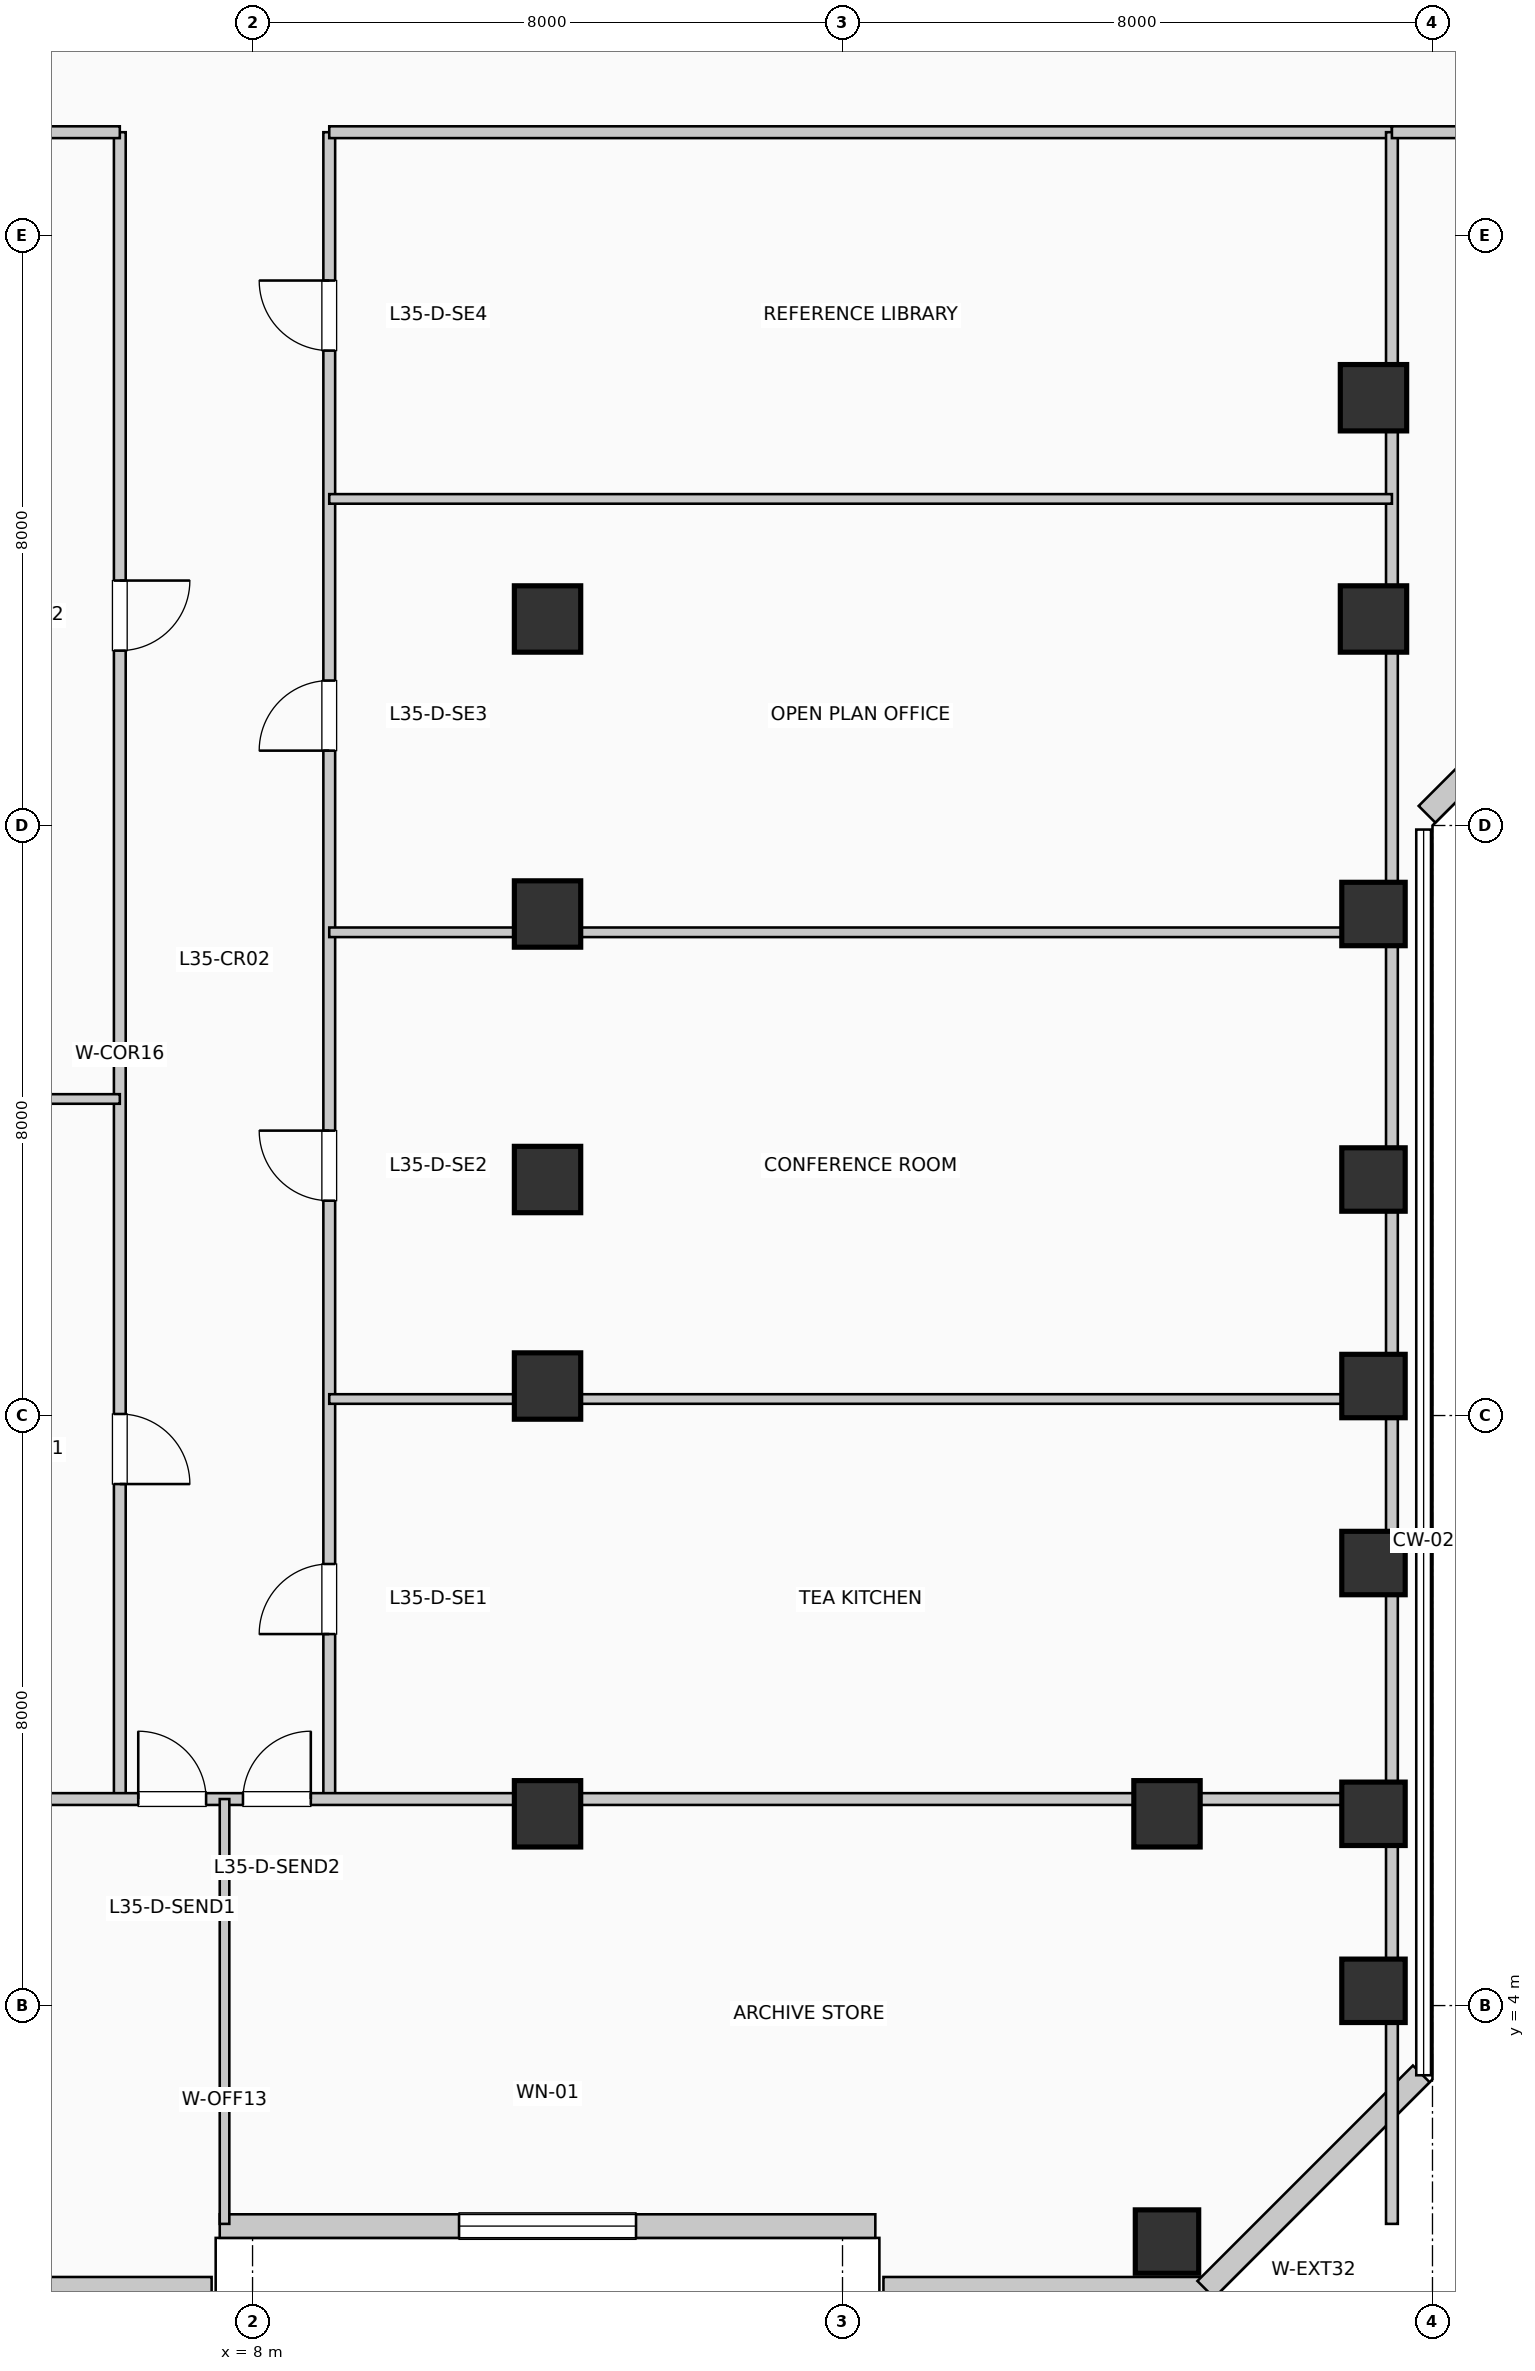
"""IFC4 building model, lengths in metres.
Left out: names, types, materials, properties, quantities, classifications, styles, units other than length and angle.
Written with IfcOpenShell. Run it as: python <this file> out.ifc"""

import sys

from ifc_helpers import new_model, si_unit, direction, frame, frame_2d, origin, origin_2d, place, context, subcontext, project, spatial, rectangle, extrude, element, fill, save


model = new_model("IFC4")
c1 = context("Model", 3, precision=1e-05, world=origin(), true_north=direction((0.0, 1.0)))
c2 = subcontext(c1, "Body", "Model", "MODEL_VIEW")
j1 = project(units=[si_unit("LENGTHUNIT", "METRE"), si_unit("PLANEANGLEUNIT", "RADIAN")], contexts=[c1])
p1 = place(None, origin())
s1 = spatial("IfcSite", under=j1, at=p1, CompositionType="ELEMENT")
p2 = place(p1, origin())
s2 = spatial("IfcBuilding", under=s1, at=p2, CompositionType="ELEMENT")
p3 = place(p2, frame((0.0, 0.0, 146.85)))
s3 = spatial("IfcBuildingStorey", under=s2, at=p3, CompositionType="ELEMENT", Elevation=146.85)
for number, where, z_axis, x_axis in (
    (1, (12.0, 6.6, 0.0), (0.0, 0.0, 1.0), (1.0, 0.0, 0.0)),
    (2, (12.0, 12.4, 0.0), (0.0, 0.0, 1.0), (1.0, 0.0, 0.0)),
    (3, (12.0, 15.2, 0.0), (0.0, 0.0, 1.0), (1.0, 0.0, 0.0)),
    (4, (12.0, 18.8, 0.0), (0.0, 0.0, 1.0), (1.0, 0.0, 0.0)),
    (5, (12.0, 22.8, 0.0), (0.0, 0.0, 1.0), (1.0, 0.0, 0.0)),
):
    element("IfcColumn", number, at=place(p3, frame(where, z_axis=z_axis, x_axis=x_axis)), inside=s3, PredefinedType="COLUMN", context=c2, shape_type="SweptSolid", body=[
        extrude(rectangle(XDim=0.9, YDim=0.9, at=origin_2d()), origin(), (0.0, 0.0, 1.0), 3.96),
    ])
p4 = place(p3, frame((20.4, 0.8, 0.0), z_axis=(0.0, 0.0, 1.0), x_axis=(1.0, 0.0, 0.0)))
e6 = element("IfcColumn", 6, at=p4, inside=s3, PredefinedType="COLUMN", context=c2, shape_type="SweptSolid", body=[
    extrude(rectangle(XDim=0.86, YDim=0.86, at=origin_2d()), origin(), (0.0, 0.0, 1.0), 3.96),
])
p5 = place(p3, frame((20.4, 6.6, 0.0), z_axis=(0.0, 0.0, 1.0), x_axis=(1.0, 0.0, 0.0)))
e7 = element("IfcColumn", 7, at=p5, inside=s3, PredefinedType="COLUMN", context=c2, shape_type="SweptSolid", body=[
    extrude(rectangle(XDim=0.9, YDim=0.9, at=origin_2d()), origin(), (0.0, 0.0, 1.0), 3.96),
])
for number, where, z_axis, x_axis in (
    (8, (23.2, 4.2, 0.0), (0.0, 0.0, 1.0), (1.0, 0.0, 0.0)),
    (9, (23.2, 6.6, 0.0), (0.0, 0.0, 1.0), (1.0, 0.0, 0.0)),
    (10, (23.2, 10.0, 0.0), (0.0, 0.0, 1.0), (1.0, 0.0, 0.0)),
    (11, (23.2, 12.4, 0.0), (0.0, 0.0, 1.0), (1.0, 0.0, 0.0)),
    (12, (23.2, 15.2, 0.0), (0.0, 0.0, 1.0), (1.0, 0.0, 0.0)),
    (13, (23.2, 18.8, 0.0), (0.0, 0.0, 1.0), (1.0, 0.0, 0.0)),
):
    element("IfcColumn", number, at=place(p3, frame(where, z_axis=z_axis, x_axis=x_axis)), inside=s3, PredefinedType="COLUMN", context=c2, shape_type="SweptSolid", body=[
        extrude(rectangle(XDim=0.86, YDim=0.86, at=origin_2d()), origin(), (0.0, 0.0, 1.0), 3.96),
    ])
for number, where, z_axis, x_axis in (
    (14, (23.2, 22.8, 0.0), (0.0, 0.0, 1.0), (1.0, 0.0, 0.0)),
    (15, (23.2, 25.8, 0.0), (0.0, 0.0, 1.0), (1.0, 0.0, 0.0)),
):
    element("IfcColumn", number, at=place(p3, frame(where, z_axis=z_axis, x_axis=x_axis)), inside=s3, PredefinedType="COLUMN", context=c2, shape_type="SweptSolid", body=[
        extrude(rectangle(XDim=0.9, YDim=0.9, at=origin_2d()), origin(), (0.0, 0.0, 1.0), 3.96),
    ])
p6 = place(p3, frame((3.055, 0.16, 0.0), z_axis=(0.0, 0.0, 1.0), x_axis=(1.0, 0.0, 0.0)))
e16 = element("IfcWall", 16, at=p6, inside=s3, PredefinedType="SOLIDWALL", context=c2, shape_type="SweptSolid", body=[
    extrude(rectangle(XDim=4.39, YDim=0.32, at=frame_2d((2.195, 0.0))), origin(), (0.0, 0.0, 1.0), 3.71),
])
p7 = place(p3, frame((7.555, 1.01, 0.0), z_axis=(0.0, 0.0, 1.0), x_axis=(1.0, 0.0, 0.0)))
e17 = element("IfcWall", 17, at=p7, inside=s3, PredefinedType="SOLIDWALL", context=c2, shape_type="SweptSolid", body=[
    extrude(rectangle(XDim=8.89, YDim=0.32, at=frame_2d((4.445, 0.0))), origin(), (0.0, 0.0, 1.0), 3.71),
])
p8 = place(p7, frame((3.245, 0.0, 0.85)))
e18 = element("IfcOpeningElement", 18, at=p8, cuts=e17, PredefinedType="OPENING", context=c2, shape_type="SweptSolid", body=[
    extrude(rectangle(XDim=2.4, YDim=2.05, at=frame_2d((1.2, 1.025))), frame((0.0, 0.17, 0.0), z_axis=(0.0, -1.0, 0.0), x_axis=(1.0, 0.0, 0.0)), (0.0, 0.0, 1.0), 0.34),
])
p9 = place(p3, frame((16.555, 0.16, 0.0), z_axis=(0.0, 0.0, 1.0), x_axis=(1.0, 0.0, 0.0)))
e19 = element("IfcWall", 19, at=p9, inside=s3, PredefinedType="SOLIDWALL", context=c2, shape_type="SweptSolid", body=[
    extrude(rectangle(XDim=4.39, YDim=0.32, at=frame_2d((2.195, 0.0))), origin(), (0.0, 0.0, 1.0), 3.71),
])
p10 = place(p3, frame((20.926, 0.152, 0.0), z_axis=(0.0, 0.0, 1.0), x_axis=(0.707106781187, 0.707106781187, 0.0)))
e20 = element("IfcWall", 20, at=p10, inside=s3, PredefinedType="SOLIDWALL", context=c2, shape_type="SweptSolid", body=[
    extrude(rectangle(XDim=4.133, YDim=0.32, at=frame_2d((2.066, 0.0))), origin(), (0.0, 0.0, 1.0), 3.71),
])
p11 = place(p3, frame((23.926, 20.152, 0.0), z_axis=(0.0, 0.0, 1.0), x_axis=(0.707106781187, 0.707106781187, 0.0)))
e21 = element("IfcWall", 21, at=p11, inside=s3, PredefinedType="SOLIDWALL", context=c2, shape_type="SweptSolid", body=[
    extrude(rectangle(XDim=2.718, YDim=0.32, at=frame_2d((1.359, 0.0))), origin(), (0.0, 0.0, 1.0), 3.71),
])
p12 = place(p3, frame((6.2, 6.8, 0.0), z_axis=(0.0, 0.0, 1.0), x_axis=(0.0, 1.0, 0.0)))
e22 = element("IfcWall", 22, at=p12, inside=s3, PredefinedType="PARTITIONING", context=c2, shape_type="SweptSolid", body=[
    extrude(rectangle(XDim=22.6, YDim=0.16, at=frame_2d((11.3, 0.0))), origin(), (0.0, 0.0, 1.0), 3.71),
])
p13 = place(p12, frame((5.221, 0.0, 0.0), z_axis=(0.0, 0.0, 1.0), x_axis=(-1.0, 0.0, 0.0)))
e23 = element("IfcOpeningElement", 23, at=p13, cuts=e22, PredefinedType="OPENING", context=c2, shape_type="SweptSolid", body=[
    extrude(rectangle(XDim=0.95, YDim=2.15, at=frame_2d((0.475, 1.075))), frame((0.0, 0.09, 0.0), z_axis=(0.0, -1.0, 0.0), x_axis=(1.0, 0.0, 0.0)), (0.0, 0.0, 1.0), 0.18),
])
p14 = place(p12, frame((16.521, 0.0, 0.0), z_axis=(0.0, 0.0, 1.0), x_axis=(-1.0, 0.0, 0.0)))
e24 = element("IfcOpeningElement", 24, at=p14, cuts=e22, PredefinedType="OPENING", context=c2, shape_type="SweptSolid", body=[
    extrude(rectangle(XDim=0.95, YDim=2.15, at=frame_2d((0.475, 1.075))), frame((0.0, 0.09, 0.0), z_axis=(0.0, -1.0, 0.0), x_axis=(1.0, 0.0, 0.0)), (0.0, 0.0, 1.0), 0.18),
])
p15 = place(p3, frame((9.04, 6.8, 0.0), z_axis=(0.0, 0.0, 1.0), x_axis=(0.0, 1.0, 0.0)))
e25 = element("IfcWall", 25, at=p15, inside=s3, PredefinedType="PARTITIONING", context=c2, shape_type="SweptSolid", body=[
    extrude(rectangle(XDim=22.6, YDim=0.16, at=frame_2d((11.3, 0.0))), origin(), (0.0, 0.0, 1.0), 3.71),
])
p16 = place(p15, frame((2.237, 0.0, 0.0)))
e26 = element("IfcOpeningElement", 26, at=p16, cuts=e25, PredefinedType="OPENING", context=c2, shape_type="SweptSolid", body=[
    extrude(rectangle(XDim=0.95, YDim=2.15, at=frame_2d((0.475, 1.075))), frame((0.0, 0.09, 0.0), z_axis=(0.0, -1.0, 0.0), x_axis=(1.0, 0.0, 0.0)), (0.0, 0.0, 1.0), 0.18),
])
p17 = place(p15, frame((8.113, 0.0, 0.0)))
e27 = element("IfcOpeningElement", 27, at=p17, cuts=e25, PredefinedType="OPENING", context=c2, shape_type="SweptSolid", body=[
    extrude(rectangle(XDim=0.95, YDim=2.15, at=frame_2d((0.475, 1.075))), frame((0.0, 0.09, 0.0), z_axis=(0.0, -1.0, 0.0), x_axis=(1.0, 0.0, 0.0)), (0.0, 0.0, 1.0), 0.18),
])
p18 = place(p15, frame((14.215, 0.0, 0.0)))
e28 = element("IfcOpeningElement", 28, at=p18, cuts=e25, PredefinedType="OPENING", context=c2, shape_type="SweptSolid", body=[
    extrude(rectangle(XDim=0.95, YDim=2.15, at=frame_2d((0.475, 1.075))), frame((0.0, 0.09, 0.0), z_axis=(0.0, -1.0, 0.0), x_axis=(1.0, 0.0, 0.0)), (0.0, 0.0, 1.0), 0.18),
])
p19 = place(p15, frame((19.639, 0.0, 0.0)))
e29 = element("IfcOpeningElement", 29, at=p19, cuts=e25, PredefinedType="OPENING", context=c2, shape_type="SweptSolid", body=[
    extrude(rectangle(XDim=0.95, YDim=2.15, at=frame_2d((0.475, 1.075))), frame((0.0, 0.09, 0.0), z_axis=(0.0, -1.0, 0.0), x_axis=(1.0, 0.0, 0.0)), (0.0, 0.0, 1.0), 0.18),
])
p20 = place(p3, frame((0.19, 6.8, 0.0), z_axis=(0.0, 0.0, 1.0), x_axis=(1.0, 0.0, 0.0)))
e30 = element("IfcWall", 30, at=p20, inside=s3, PredefinedType="PARTITIONING", context=c2, shape_type="SweptSolid", body=[
    extrude(rectangle(XDim=23.26, YDim=0.16, at=frame_2d((11.63, 0.0))), origin(), (0.0, 0.0, 1.0), 3.045),
])
p21 = place(p20, frame((6.26, 0.0, 0.0)))
e31 = element("IfcOpeningElement", 31, at=p21, cuts=e30, PredefinedType="OPENING", context=c2, shape_type="SweptSolid", body=[
    extrude(rectangle(XDim=0.92, YDim=2.1, at=frame_2d((0.46, 1.05))), frame((0.0, 0.09, 0.0), z_axis=(0.0, -1.0, 0.0), x_axis=(1.0, 0.0, 0.0)), (0.0, 0.0, 1.0), 0.18),
])
p22 = place(p20, frame((7.68, 0.0, 0.0)))
e32 = element("IfcOpeningElement", 32, at=p22, cuts=e30, PredefinedType="OPENING", context=c2, shape_type="SweptSolid", body=[
    extrude(rectangle(XDim=0.92, YDim=2.1, at=frame_2d((0.46, 1.05))), frame((0.0, 0.09, 0.0), z_axis=(0.0, -1.0, 0.0), x_axis=(1.0, 0.0, 0.0)), (0.0, 0.0, 1.0), 0.18),
])
p23 = place(p3, frame((0.19, 29.4, 0.0), z_axis=(0.0, 0.0, 1.0), x_axis=(1.0, 0.0, 0.0)))
e33 = element("IfcWall", 33, at=p23, inside=s3, PredefinedType="PARTITIONING", context=c2, shape_type="SweptSolid", body=[
    extrude(rectangle(XDim=6.01, YDim=0.16, at=frame_2d((3.005, 0.0))), origin(), (0.0, 0.0, 1.0), 3.365),
])
p24 = place(p3, frame((9.04, 29.4, 0.0), z_axis=(0.0, 0.0, 1.0), x_axis=(1.0, 0.0, 0.0)))
e34 = element("IfcWall", 34, at=p24, inside=s3, PredefinedType="PARTITIONING", context=c2, shape_type="SweptSolid", body=[
    extrude(rectangle(XDim=14.41, YDim=0.16, at=frame_2d((7.205, 0.0))), origin(), (0.0, 0.0, 1.0), 3.365),
])
p25 = place(p3, frame((23.45, 1.04, 0.0), z_axis=(0.0, 0.0, 1.0), x_axis=(0.0, 1.0, 0.0)))
e35 = element("IfcWall", 35, at=p25, inside=s3, PredefinedType="PARTITIONING", context=c2, shape_type="SweptSolid", body=[
    extrude(rectangle(XDim=28.36, YDim=0.16, at=frame_2d((14.18, 0.0))), origin(), (0.0, 0.0, 1.0), 3.045),
])
p26 = place(p3, frame((7.62, 1.04, 0.0), z_axis=(0.0, 0.0, 1.0), x_axis=(0.0, 1.0, 0.0)))
e36 = element("IfcWall", 36, at=p26, inside=s3, PredefinedType="PARTITIONING", context=c2, shape_type="SweptSolid", body=[
    extrude(rectangle(XDim=5.76, YDim=0.13, at=frame_2d((2.88, 0.0))), origin(), (0.0, 0.0, 1.0), 3.71),
])
p27 = place(p3, frame((0.19, 16.292, 0.0), z_axis=(0.0, 0.0, 1.0), x_axis=(1.0, 0.0, 0.0)))
e37 = element("IfcWall", 37, at=p27, inside=s3, PredefinedType="PARTITIONING", context=c2, shape_type="SweptSolid", body=[
    extrude(rectangle(XDim=6.01, YDim=0.13, at=frame_2d((3.005, 0.0))), origin(), (0.0, 0.0, 1.0), 3.71),
])
for number, where, z_axis, x_axis in (
    (38, (9.04, 12.224, 0.0), (0.0, 0.0, 1.0), (1.0, 0.0, 0.0)),
    (39, (9.04, 18.552, 0.0), (0.0, 0.0, 1.0), (1.0, 0.0, 0.0)),
):
    element("IfcWall", number, at=place(p3, frame(where, z_axis=z_axis, x_axis=x_axis)), inside=s3, PredefinedType="PARTITIONING", context=c2, shape_type="SweptSolid", body=[
        extrude(rectangle(XDim=14.41, YDim=0.13, at=frame_2d((7.205, 0.0))), origin(), (0.0, 0.0, 1.0), 3.045),
    ])
p28 = place(p3, frame((9.04, 24.428, 0.0), z_axis=(0.0, 0.0, 1.0), x_axis=(1.0, 0.0, 0.0)))
e40 = element("IfcWall", 40, at=p28, inside=s3, PredefinedType="PARTITIONING", context=c2, shape_type="SweptSolid", body=[
    extrude(rectangle(XDim=14.41, YDim=0.13, at=frame_2d((7.205, 0.0))), origin(), (0.0, 0.0, 1.0), 3.71),
])
p29 = place(p3, frame((23.45, 29.4, 0.0), z_axis=(0.0, 0.0, 1.0), x_axis=(1.0, 0.0, 0.0)))
e41 = element("IfcWall", 41, at=p29, inside=s3, PredefinedType="PARTITIONING", context=c2, shape_type="SweptSolid", body=[
    extrude(rectangle(XDim=26.56, YDim=0.16, at=frame_2d((13.28, 0.0))), origin(), (0.0, 0.0, 1.0), 3.365),
])
p30 = place(p29, frame((4.725, 0.0, 0.0), z_axis=(0.0, 0.0, 1.0), x_axis=(-1.0, 0.0, 0.0)))
e42 = element("IfcOpeningElement", 42, at=p30, cuts=e41, PredefinedType="OPENING", context=c2, shape_type="SweptSolid", body=[
    extrude(rectangle(XDim=0.95, YDim=2.15, at=frame_2d((0.475, 1.075))), frame((0.0, 0.09, 0.0), z_axis=(0.0, -1.0, 0.0), x_axis=(1.0, 0.0, 0.0)), (0.0, 0.0, 1.0), 0.18),
])
p31 = place(p29, frame((13.755, 0.0, 0.0), z_axis=(0.0, 0.0, 1.0), x_axis=(-1.0, 0.0, 0.0)))
e43 = element("IfcOpeningElement", 43, at=p31, cuts=e41, PredefinedType="OPENING", context=c2, shape_type="SweptSolid", body=[
    extrude(rectangle(XDim=0.95, YDim=2.15, at=frame_2d((0.475, 1.075))), frame((0.0, 0.09, 0.0), z_axis=(0.0, -1.0, 0.0), x_axis=(1.0, 0.0, 0.0)), (0.0, 0.0, 1.0), 0.18),
])
p32 = place(p29, frame((22.785, 0.0, 0.0), z_axis=(0.0, 0.0, 1.0), x_axis=(-1.0, 0.0, 0.0)))
e44 = element("IfcOpeningElement", 44, at=p32, cuts=e41, PredefinedType="OPENING", context=c2, shape_type="SweptSolid", body=[
    extrude(rectangle(XDim=0.95, YDim=2.15, at=frame_2d((0.475, 1.075))), frame((0.0, 0.09, 0.0), z_axis=(0.0, -1.0, 0.0), x_axis=(1.0, 0.0, 0.0)), (0.0, 0.0, 1.0), 0.18),
])
p33 = place(p8, origin())
e45 = element("IfcWindow", 45, at=p33, inside=s3, PartitioningType="SINGLE_PANEL", PredefinedType="WINDOW", context=c2, shape_type="SweptSolid", body=[
    extrude(rectangle(XDim=2.4, YDim=2.05, at=frame_2d((1.2, 1.025))), frame((0.0, 0.03, 0.0), z_axis=(0.0, -1.0, 0.0), x_axis=(1.0, 0.0, 0.0)), (0.0, 0.0, 1.0), 0.06),
])
fill(e18, e45)
p34 = place(p21, origin())
e46 = element("IfcDoor", 46, at=p34, inside=s3, OperationType="SINGLE_SWING_LEFT", PredefinedType="DOOR", context=c2, shape_type="SweptSolid", body=[
    extrude(rectangle(XDim=0.92, YDim=2.1, at=frame_2d((0.46, 1.05))), frame((0.0, 0.025, 0.0), z_axis=(0.0, -1.0, 0.0), x_axis=(1.0, 0.0, 0.0)), (0.0, 0.0, 1.0), 0.05),
])
fill(e31, e46)
p35 = place(p22, origin())
e47 = element("IfcDoor", 47, at=p35, inside=s3, OperationType="SINGLE_SWING_RIGHT", PredefinedType="DOOR", context=c2, shape_type="SweptSolid", body=[
    extrude(rectangle(XDim=0.92, YDim=2.1, at=frame_2d((0.46, 1.05))), frame((0.0, 0.025, 0.0), z_axis=(0.0, -1.0, 0.0), x_axis=(1.0, 0.0, 0.0)), (0.0, 0.0, 1.0), 0.05),
])
fill(e32, e47)
p36 = place(p13, origin())
e48 = element("IfcDoor", 48, at=p36, inside=s3, OperationType="SINGLE_SWING_LEFT", PredefinedType="DOOR", context=c2, shape_type="SweptSolid", body=[
    extrude(rectangle(XDim=0.95, YDim=2.15, at=frame_2d((0.475, 1.075))), frame((0.0, 0.025, 0.0), z_axis=(0.0, -1.0, 0.0), x_axis=(1.0, 0.0, 0.0)), (0.0, 0.0, 1.0), 0.05),
])
fill(e23, e48)
p37 = place(p14, origin())
e49 = element("IfcDoor", 49, at=p37, inside=s3, OperationType="SINGLE_SWING_RIGHT", PredefinedType="DOOR", context=c2, shape_type="SweptSolid", body=[
    extrude(rectangle(XDim=0.95, YDim=2.15, at=frame_2d((0.475, 1.075))), frame((0.0, 0.025, 0.0), z_axis=(0.0, -1.0, 0.0), x_axis=(1.0, 0.0, 0.0)), (0.0, 0.0, 1.0), 0.05),
])
fill(e24, e49)
p38 = place(p16, origin())
e50 = element("IfcDoor", 50, at=p38, inside=s3, OperationType="SINGLE_SWING_LEFT", PredefinedType="DOOR", context=c2, shape_type="SweptSolid", body=[
    extrude(rectangle(XDim=0.95, YDim=2.15, at=frame_2d((0.475, 1.075))), frame((0.0, 0.025, 0.0), z_axis=(0.0, -1.0, 0.0), x_axis=(1.0, 0.0, 0.0)), (0.0, 0.0, 1.0), 0.05),
])
fill(e26, e50)
p39 = place(p17, origin())
e51 = element("IfcDoor", 51, at=p39, inside=s3, OperationType="SINGLE_SWING_RIGHT", PredefinedType="DOOR", context=c2, shape_type="SweptSolid", body=[
    extrude(rectangle(XDim=0.95, YDim=2.15, at=frame_2d((0.475, 1.075))), frame((0.0, 0.025, 0.0), z_axis=(0.0, -1.0, 0.0), x_axis=(1.0, 0.0, 0.0)), (0.0, 0.0, 1.0), 0.05),
])
fill(e27, e51)
p40 = place(p18, origin())
e52 = element("IfcDoor", 52, at=p40, inside=s3, OperationType="SINGLE_SWING_LEFT", PredefinedType="DOOR", context=c2, shape_type="SweptSolid", body=[
    extrude(rectangle(XDim=0.95, YDim=2.15, at=frame_2d((0.475, 1.075))), frame((0.0, 0.025, 0.0), z_axis=(0.0, -1.0, 0.0), x_axis=(1.0, 0.0, 0.0)), (0.0, 0.0, 1.0), 0.05),
])
fill(e28, e52)
p41 = place(p19, origin())
e53 = element("IfcDoor", 53, at=p41, inside=s3, OperationType="SINGLE_SWING_RIGHT", PredefinedType="DOOR", context=c2, shape_type="SweptSolid", body=[
    extrude(rectangle(XDim=0.95, YDim=2.15, at=frame_2d((0.475, 1.075))), frame((0.0, 0.025, 0.0), z_axis=(0.0, -1.0, 0.0), x_axis=(1.0, 0.0, 0.0)), (0.0, 0.0, 1.0), 0.05),
])
fill(e29, e53)
save(model, sys.argv[1])
